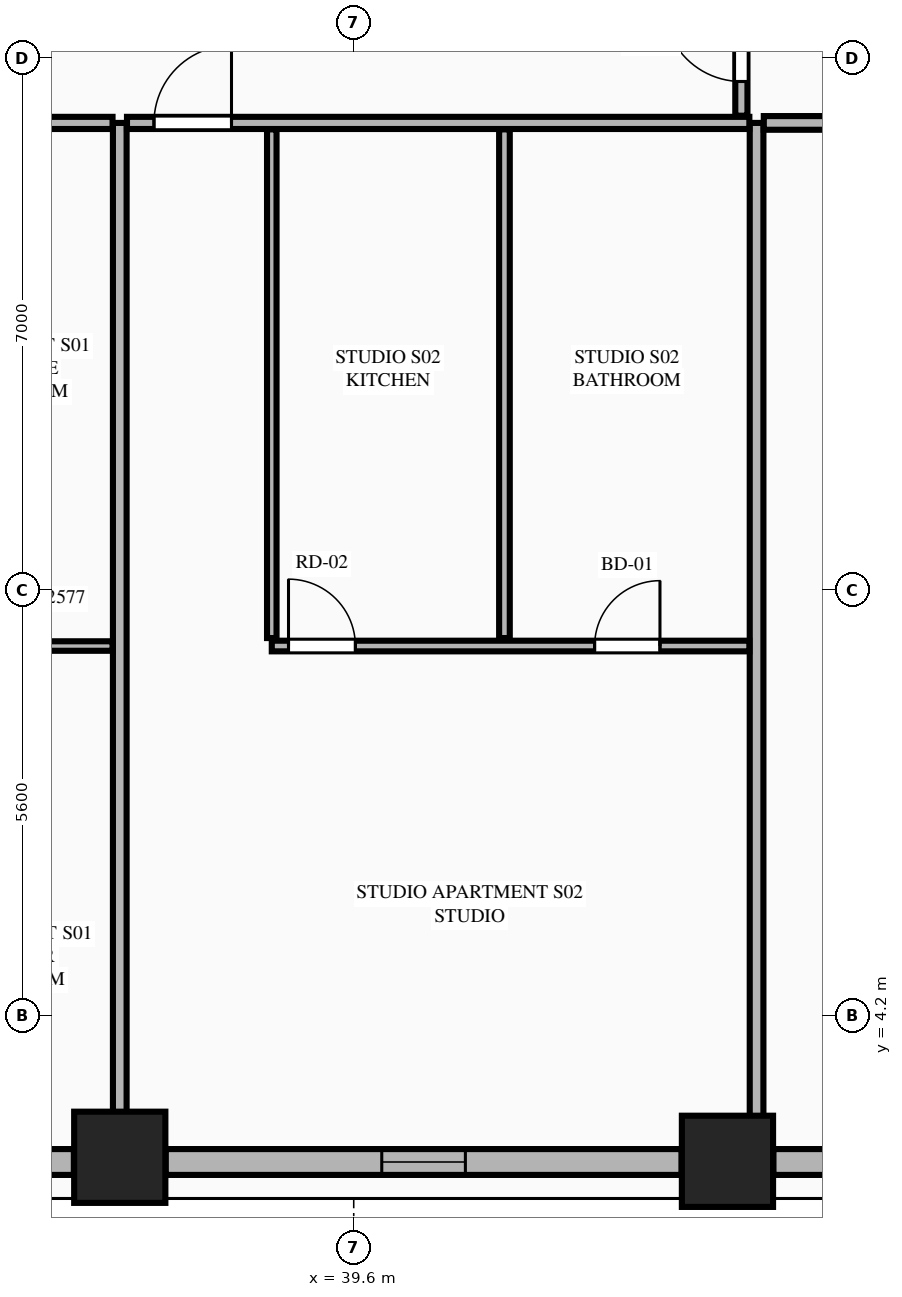
"""IFC4 building model, lengths in metres.
Left out: names, types, materials, properties, quantities, classifications, styles, units other than length and angle.
Written with IfcOpenShell. Run it as: python <this file> out.ifc"""

import sys

from ifc_helpers import new_model, si_unit, direction, frame, frame_2d, origin, origin_2d, place, context, subcontext, project, spatial, rectangle, extrude, element, fill, save


model = new_model("IFC4")
c1 = context("Model", 3, precision=1e-05, world=origin(), true_north=direction((0.0, 1.0)))
c2 = subcontext(c1, "Body", "Model", "MODEL_VIEW")
j1 = project(units=[si_unit("LENGTHUNIT", "METRE"), si_unit("PLANEANGLEUNIT", "RADIAN")], contexts=[c1])
p1 = place(None, origin())
s1 = spatial("IfcSite", under=j1, at=p1, CompositionType="ELEMENT")
p2 = place(p1, origin())
s2 = spatial("IfcBuilding", under=s1, at=p2, CompositionType="ELEMENT")
p3 = place(p2, frame((0.0, 0.0, 56.85)))
s3 = spatial("IfcBuildingStorey", under=s2, at=p3, CompositionType="ELEMENT", Elevation=56.85)
for number, where, z_axis, x_axis in (
    (1, (36.522, 2.342, 0.0), (0.0, 0.0, 1.0), (1.0, 0.0, 0.0)),
    (2, (44.517, 2.289, 0.0), (0.0, 0.0, 1.0), (1.0, 0.0, 0.0)),
):
    element("IfcColumn", number, at=place(p3, frame(where, z_axis=z_axis, x_axis=x_axis)), inside=s3, PredefinedType="COLUMN", context=c2, shape_type="SweptSolid", body=[
        extrude(rectangle(XDim=1.2, YDim=1.2, at=origin_2d()), origin(), (0.0, 0.0, 1.0), 3.55),
    ])
p4 = place(p3, frame((28.882, 2.28, 0.0), z_axis=(0.0, 0.0, 1.0), x_axis=(1.0, 0.0, 0.0)))
e3 = element("IfcWall", 3, at=p4, inside=s3, PredefinedType="STANDARD", context=c2, shape_type="SweptSolid", body=[
    extrude(rectangle(XDim=7.036, YDim=0.34, at=frame_2d((3.518, 0.0))), origin(), (0.0, 0.0, 1.0), 2.787),
])
p5 = place(p4, frame((1.878, 0.0, 0.75)))
e4 = element("IfcOpeningElement", 4, at=p5, cuts=e3, PredefinedType="OPENING", context=c2, shape_type="SweptSolid", body=[
    extrude(rectangle(XDim=1.1, YDim=1.887, at=frame_2d((0.55, 0.943))), frame((0.0, 0.18, 0.0), z_axis=(0.0, -1.0, 0.0), x_axis=(1.0, 0.0, 0.0)), (0.0, 0.0, 1.0), 0.36),
])
p6 = place(p4, frame((5.508, 0.0, 0.75)))
e5 = element("IfcOpeningElement", 5, at=p6, cuts=e3, PredefinedType="OPENING", context=c2, shape_type="SweptSolid", body=[
    extrude(rectangle(XDim=1.1, YDim=1.887, at=frame_2d((0.55, 0.943))), frame((0.0, 0.18, 0.0), z_axis=(0.0, -1.0, 0.0), x_axis=(1.0, 0.0, 0.0)), (0.0, 0.0, 1.0), 0.36),
])
p7 = place(p3, frame((37.126, 2.28, 0.0), z_axis=(0.0, 0.0, 1.0), x_axis=(1.0, 0.0, 0.0)))
e6 = element("IfcWall", 6, at=p7, inside=s3, PredefinedType="STANDARD", context=c2, shape_type="SweptSolid", body=[
    extrude(rectangle(XDim=6.787, YDim=0.34, at=frame_2d((3.394, 0.0))), origin(), (0.0, 0.0, 1.0), 2.787),
])
p8 = place(p7, frame((2.843, 0.0, 0.75)))
e7 = element("IfcOpeningElement", 7, at=p8, cuts=e6, PredefinedType="OPENING", context=c2, shape_type="SweptSolid", body=[
    extrude(rectangle(XDim=1.1, YDim=1.887, at=frame_2d((0.55, 0.943))), frame((0.0, 0.18, 0.0), z_axis=(0.0, -1.0, 0.0), x_axis=(1.0, 0.0, 0.0)), (0.0, 0.0, 1.0), 0.36),
])
p9 = place(p3, frame((45.121, 2.28, 0.0), z_axis=(0.0, 0.0, 1.0), x_axis=(1.0, 0.0, 0.0)))
e8 = element("IfcWall", 8, at=p9, inside=s3, PredefinedType="STANDARD", context=c2, shape_type="SweptSolid", body=[
    extrude(rectangle(XDim=1.245, YDim=0.34, at=frame_2d((0.623, 0.0))), origin(), (0.0, 0.0, 1.0), 3.33),
])
p10 = place(p3, frame((36.522, 2.455, 0.0), z_axis=(0.0, 0.0, 1.0), x_axis=(0.0, 1.0, 0.0)))
e9 = element("IfcWall", 9, at=p10, inside=s3, PredefinedType="PARTITIONING", context=c2, shape_type="SweptSolid", body=[
    extrude(rectangle(XDim=13.495, YDim=0.18, at=frame_2d((6.748, 0.0))), origin(), (0.0, 0.0, 1.0), 2.7),
])
p11 = place(p3, frame((44.9, 2.455, 0.0), z_axis=(0.0, 0.0, 1.0), x_axis=(0.0, 1.0, 0.0)))
e10 = element("IfcWall", 10, at=p11, inside=s3, PredefinedType="PARTITIONING", context=c2, shape_type="SweptSolid", body=[
    extrude(rectangle(XDim=13.495, YDim=0.18, at=frame_2d((6.748, 0.0))), origin(), (0.0, 0.0, 1.0), 3.33),
])
p12 = place(p3, frame((19.995, 15.95, 0.0), z_axis=(0.0, 0.0, 1.0), x_axis=(1.0, 0.0, 0.0)))
e11 = element("IfcWall", 11, at=p12, inside=s3, PredefinedType="PARTITIONING", context=c2, shape_type="SweptSolid", body=[
    extrude(rectangle(XDim=16.432, YDim=0.16, at=frame_2d((8.216, 0.0))), origin(), (0.0, 0.0, 1.0), 3.33),
])
p13 = place(p12, frame((0.705, 0.0, 0.0)))
e12 = element("IfcOpeningElement", 12, at=p13, cuts=e11, PredefinedType="OPENING", context=c2, shape_type="SweptSolid", body=[
    extrude(rectangle(XDim=1.35, YDim=2.35, at=frame_2d((0.675, 1.175))), frame((0.0, 0.09, 0.0), z_axis=(0.0, -1.0, 0.0), x_axis=(1.0, 0.0, 0.0)), (0.0, 0.0, 1.0), 0.18),
])
p14 = place(p3, frame((33.85, 9.068, 0.0), z_axis=(0.0, 0.0, 1.0), x_axis=(1.0, 0.0, 0.0)))
e13 = element("IfcWall", 13, at=p14, inside=s3, PredefinedType="PARTITIONING", context=c2, shape_type="SweptSolid", body=[
    extrude(rectangle(XDim=2.577, YDim=0.125, at=frame_2d((1.289, 0.0))), origin(), (0.0, 0.0, 1.0), 3.33),
])
p15 = place(p14, frame((0.863, 0.0, 0.0)))
e14 = element("IfcOpeningElement", 14, at=p15, cuts=e13, PredefinedType="OPENING", context=c2, shape_type="SweptSolid", body=[
    extrude(rectangle(XDim=0.86, YDim=2.1, at=frame_2d((0.43, 1.05))), frame((0.0, 0.073, 0.0), z_axis=(0.0, -1.0, 0.0), x_axis=(1.0, 0.0, 0.0)), (0.0, 0.0, 1.0), 0.145),
])
p16 = place(p3, frame((36.617, 15.95, 0.0), z_axis=(0.0, 0.0, 1.0), x_axis=(1.0, 0.0, 0.0)))
e15 = element("IfcWall", 15, at=p16, inside=s3, PredefinedType="PARTITIONING", context=c2, shape_type="SweptSolid", body=[
    extrude(rectangle(XDim=8.188, YDim=0.16, at=frame_2d((4.094, 0.0))), origin(), (0.0, 0.0, 1.0), 3.33),
])
p17 = place(p16, frame((0.355, 0.0, 0.0)))
e16 = element("IfcOpeningElement", 16, at=p17, cuts=e15, PredefinedType="OPENING", context=c2, shape_type="SweptSolid", body=[
    extrude(rectangle(XDim=1.02, YDim=2.25, at=frame_2d((0.51, 1.125))), frame((0.0, 0.09, 0.0), z_axis=(0.0, -1.0, 0.0), x_axis=(1.0, 0.0, 0.0)), (0.0, 0.0, 1.0), 0.18),
])
p18 = place(p3, frame((38.522, 9.173, 0.0), z_axis=(0.0, 0.0, 1.0), x_axis=(0.0, 1.0, 0.0)))
e17 = element("IfcWall", 17, at=p18, inside=s3, PredefinedType="PARTITIONING", context=c2, shape_type="SweptSolid", body=[
    extrude(rectangle(XDim=6.692, YDim=0.125, at=frame_2d((3.346, 0.0))), origin(), (0.0, 0.0, 1.0), 3.33),
])
p19 = place(p3, frame((38.522, 9.068, 0.0), z_axis=(0.0, 0.0, 1.0), x_axis=(1.0, 0.0, 0.0)))
e18 = element("IfcWall", 18, at=p19, inside=s3, PredefinedType="PLUMBINGWALL", context=c2, shape_type="SweptSolid", body=[
    extrude(rectangle(XDim=6.283, YDim=0.14, at=frame_2d((3.142, 0.0))), origin(), (0.0, 0.0, 1.0), 3.33),
])
p20 = place(p19, frame((4.247, 0.0, 0.0)))
e19 = element("IfcOpeningElement", 19, at=p20, cuts=e18, PredefinedType="OPENING", context=c2, shape_type="SweptSolid", body=[
    extrude(rectangle(XDim=0.86, YDim=2.1, at=frame_2d((0.43, 1.05))), frame((0.0, 0.08, 0.0), z_axis=(0.0, -1.0, 0.0), x_axis=(1.0, 0.0, 0.0)), (0.0, 0.0, 1.0), 0.16),
])
p21 = place(p19, frame((0.22, 0.0, 0.0)))
e20 = element("IfcOpeningElement", 20, at=p21, cuts=e18, PredefinedType="OPENING", context=c2, shape_type="SweptSolid", body=[
    extrude(rectangle(XDim=0.88, YDim=2.15, at=frame_2d((0.44, 1.075))), frame((0.0, 0.08, 0.0), z_axis=(0.0, -1.0, 0.0), x_axis=(1.0, 0.0, 0.0)), (0.0, 0.0, 1.0), 0.16),
])
p22 = place(p3, frame((41.583, 9.173, 0.0), z_axis=(0.0, 0.0, 1.0), x_axis=(0.0, 1.0, 0.0)))
e21 = element("IfcWall", 21, at=p22, inside=s3, PredefinedType="PLUMBINGWALL", context=c2, shape_type="SweptSolid", body=[
    extrude(rectangle(XDim=6.692, YDim=0.14, at=frame_2d((3.346, 0.0))), origin(), (0.0, 0.0, 1.0), 3.33),
])
p23 = place(p3, frame((44.995, 15.95, 0.0), z_axis=(0.0, 0.0, 1.0), x_axis=(1.0, 0.0, 0.0)))
e22 = element("IfcWall", 22, at=p23, inside=s3, PredefinedType="PARTITIONING", context=c2, shape_type="SweptSolid", body=[
    extrude(rectangle(XDim=9.241, YDim=0.18, at=frame_2d((4.621, 0.0))), origin(), (0.0, 0.0, 1.0), 3.33),
])
p24 = place(p3, frame((44.7, 16.045, 0.0), z_axis=(0.0, 0.0, 1.0), x_axis=(0.0, 1.0, 0.0)))
e23 = element("IfcWall", 23, at=p24, inside=s3, PredefinedType="PARTITIONING", context=c2, shape_type="SweptSolid", body=[
    extrude(rectangle(XDim=19.71, YDim=0.16, at=frame_2d((9.855, 0.0))), origin(), (0.0, 0.0, 1.0), 2.7),
])
p25 = place(p24, frame((0.45, 0.0, 0.0)))
e24 = element("IfcOpeningElement", 24, at=p25, cuts=e23, PredefinedType="OPENING", context=c2, shape_type="SweptSolid", body=[
    extrude(rectangle(XDim=1.02, YDim=2.25, at=frame_2d((0.51, 1.125))), frame((0.0, 0.09, 0.0), z_axis=(0.0, -1.0, 0.0), x_axis=(1.0, 0.0, 0.0)), (0.0, 0.0, 1.0), 0.18),
])
p26 = place(p8, origin())
e25 = element("IfcWindow", 25, at=p26, inside=s3, PartitioningType="SINGLE_PANEL", PredefinedType="WINDOW", context=c2, shape_type="SweptSolid", body=[
    extrude(rectangle(XDim=1.1, YDim=1.887, at=frame_2d((0.55, 0.943))), frame((0.0, 0.03, 0.0), z_axis=(0.0, -1.0, 0.0), x_axis=(1.0, 0.0, 0.0)), (0.0, 0.0, 1.0), 0.06),
])
fill(e7, e25)
p27 = place(p20, origin())
e26 = element("IfcDoor", 26, at=p27, inside=s3, OperationType="SINGLE_SWING_RIGHT", PredefinedType="DOOR", context=c2, shape_type="SweptSolid", body=[
    extrude(rectangle(XDim=0.86, YDim=2.1, at=frame_2d((0.43, 1.05))), frame((0.0, 0.025, 0.0), z_axis=(0.0, -1.0, 0.0), x_axis=(1.0, 0.0, 0.0)), (0.0, 0.0, 1.0), 0.05),
])
fill(e19, e26)
p28 = place(p17, origin())
e27 = element("IfcDoor", 27, at=p28, inside=s3, OperationType="SINGLE_SWING_RIGHT", PredefinedType="DOOR", context=c2, shape_type="SweptSolid", body=[
    extrude(rectangle(XDim=1.02, YDim=2.25, at=frame_2d((0.51, 1.125))), frame((0.0, 0.025, 0.0), z_axis=(0.0, -1.0, 0.0), x_axis=(1.0, 0.0, 0.0)), (0.0, 0.0, 1.0), 0.05),
])
fill(e16, e27)
p29 = place(p21, origin())
e28 = element("IfcDoor", 28, at=p29, inside=s3, OperationType="SINGLE_SWING_LEFT", PredefinedType="DOOR", context=c2, shape_type="SweptSolid", body=[
    extrude(rectangle(XDim=0.88, YDim=2.15, at=frame_2d((0.44, 1.075))), frame((0.0, 0.025, 0.0), z_axis=(0.0, -1.0, 0.0), x_axis=(1.0, 0.0, 0.0)), (0.0, 0.0, 1.0), 0.05),
])
fill(e20, e28)
p30 = place(p25, origin())
e29 = element("IfcDoor", 29, at=p30, inside=s3, OperationType="SINGLE_SWING_RIGHT", PredefinedType="DOOR", context=c2, shape_type="SweptSolid", body=[
    extrude(rectangle(XDim=1.02, YDim=2.25, at=frame_2d((0.51, 1.125))), frame((0.0, 0.025, 0.0), z_axis=(0.0, -1.0, 0.0), x_axis=(1.0, 0.0, 0.0)), (0.0, 0.0, 1.0), 0.05),
])
fill(e24, e29)
save(model, sys.argv[1])
